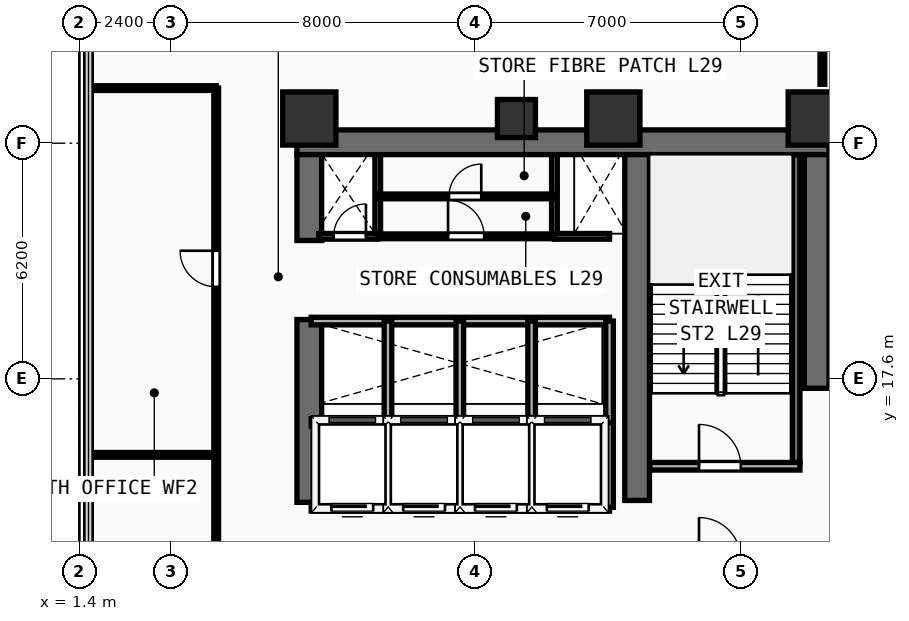
"""IFC4 building model, lengths in metres.
Left out: names, types, materials, properties, quantities, classifications, styles, units other than length and angle.
Written with IfcOpenShell. Run it as: python <this file> out.ifc"""

import sys

from ifc_helpers import new_model, si_unit, direction, frame, frame_2d, origin, origin_2d, place, context, subcontext, project, spatial, rectangle, extrude, element, fill, save


model = new_model("IFC4")
c1 = context("Model", 3, precision=1e-05, world=origin(), true_north=direction((0.0, 1.0)))
c2 = subcontext(c1, "Body", "Model", "MODEL_VIEW")
j1 = project(units=[si_unit("LENGTHUNIT", "METRE"), si_unit("PLANEANGLEUNIT", "RADIAN")], contexts=[c1])
p1 = place(None, origin())
s1 = spatial("IfcSite", under=j1, at=p1, CompositionType="ELEMENT")
p2 = place(p1, origin())
s2 = spatial("IfcBuilding", under=s1, at=p2, CompositionType="ELEMENT")
p3 = place(p2, frame((0.0, 0.0, 114.5)))
s3 = spatial("IfcBuildingStorey", under=s2, at=p3, CompositionType="ELEMENT", Elevation=114.5)
p4 = place(p3, frame((7.125, 23.825, 0.0), z_axis=(0.0, 0.0, 1.0), x_axis=(1.0, 0.0, 0.0)))
e1 = element("IfcWall", 1, at=p4, inside=s3, PredefinedType="SHEAR", context=c2, shape_type="SweptSolid", body=[
    extrude(rectangle(XDim=14.0, YDim=0.65, at=frame_2d((7.0, 0.0))), origin(), (0.0, 0.0, 1.0), 3.54),
])
p5 = place(p3, frame((7.45, 14.35, 0.0), z_axis=(0.0, 0.0, 1.0), x_axis=(0.0, 1.0, 0.0)))
e2 = element("IfcWall", 2, at=p5, inside=s3, PredefinedType="SHEAR", context=c2, shape_type="SweptSolid", body=[
    extrude(rectangle(XDim=4.81, YDim=0.65, at=frame_2d((2.405, 0.0))), origin(), (0.0, 0.0, 1.0), 3.54),
])
p6 = place(p3, frame((7.45, 21.24, 0.0), z_axis=(0.0, 0.0, 1.0), x_axis=(0.0, 1.0, 0.0)))
e3 = element("IfcWall", 3, at=p6, inside=s3, PredefinedType="SHEAR", context=c2, shape_type="SweptSolid", body=[
    extrude(rectangle(XDim=2.26, YDim=0.65, at=frame_2d((1.13, 0.0))), origin(), (0.0, 0.0, 1.0), 3.54),
])
p7 = place(p3, frame((20.8, 17.35, 0.0), z_axis=(0.0, 0.0, 1.0), x_axis=(0.0, 1.0, 0.0)))
e4 = element("IfcWall", 4, at=p7, inside=s3, PredefinedType="SHEAR", context=c2, shape_type="SweptSolid", body=[
    extrude(rectangle(XDim=6.15, YDim=0.65, at=frame_2d((3.075, 0.0))), origin(), (0.0, 0.0, 1.0), 3.54),
])
p8 = place(p3, frame((16.075, 14.4, 0.0), z_axis=(0.0, 0.0, 1.0), x_axis=(0.0, 1.0, 0.0)))
e5 = element("IfcWall", 5, at=p8, inside=s3, PredefinedType="SHEAR", context=c2, shape_type="SweptSolid", body=[
    extrude(rectangle(XDim=9.1, YDim=0.65, at=frame_2d((4.55, 0.0))), origin(), (0.0, 0.0, 1.0), 3.54),
])
for number, where, z_axis, x_axis in (
    (6, (7.45, 24.45, 0.0), (0.0, 0.0, 1.0), (1.0, 0.0, 0.0)),
    (7, (15.45, 24.45, 0.0), (0.0, 0.0, 1.0), (1.0, 0.0, 0.0)),
    (8, (20.75, 24.45, 0.0), (0.0, 0.0, 1.0), (1.0, 0.0, 0.0)),
):
    element("IfcColumn", number, at=place(p3, frame(where, z_axis=z_axis, x_axis=x_axis)), inside=s3, PredefinedType="COLUMN", context=c2, shape_type="SweptSolid", body=[
        extrude(rectangle(XDim=1.4, YDim=1.4, at=origin_2d()), origin(), (0.0, 0.0, 1.0), 3.54),
    ])
p9 = place(p3, frame((12.9, 24.45, 0.0), z_axis=(0.0, 0.0, 1.0), x_axis=(1.0, 0.0, 0.0)))
e9 = element("IfcColumn", 9, at=p9, inside=s3, PredefinedType="COLUMN", context=c2, shape_type="SweptSolid", body=[
    extrude(rectangle(XDim=1.0, YDim=1.0, at=origin_2d()), origin(), (0.0, 0.0, 1.0), 3.54),
])
p10 = place(p3, frame((20.26, 15.4, 0.0), z_axis=(0.0, 0.0, 1.0), x_axis=(0.0, 1.0, 0.0)))
e10 = element("IfcWall", 10, at=p10, inside=s3, PredefinedType="SHEAR", context=c2, shape_type="SweptSolid", body=[
    extrude(rectangle(XDim=8.09, YDim=0.2, at=frame_2d((4.045, 0.0))), origin(), (0.0, 0.0, 1.0), 3.54),
])
p11 = place(p3, frame((16.41, 15.3, 0.0), z_axis=(0.0, 0.0, 1.0), x_axis=(1.0, 0.0, 0.0)))
e11 = element("IfcWall", 11, at=p11, inside=s3, PredefinedType="PARTITIONING", context=c2, shape_type="SweptSolid", body=[
    extrude(rectangle(XDim=3.95, YDim=0.2, at=frame_2d((1.975, 0.0))), origin(), (0.0, 0.0, 1.0), 3.54),
])
p12 = place(p11, frame((1.294, 0.0, 0.0)))
e12 = element("IfcOpeningElement", 12, at=p12, cuts=e11, PredefinedType="OPENING", context=c2, shape_type="SweptSolid", body=[
    extrude(rectangle(XDim=1.1, YDim=2.2, at=frame_2d((0.55, 1.1))), frame((0.0, 0.11, 0.0), z_axis=(0.0, -1.0, 0.0), x_axis=(1.0, 0.0, 0.0)), (0.0, 0.0, 1.0), 0.22),
])
p13 = place(p3, frame((7.5, 14.22, 0.0), z_axis=(0.0, 0.0, 1.0), x_axis=(1.0, 0.0, 0.0)))
e13 = element("IfcWall", 13, at=p13, inside=s3, PredefinedType="PARTITIONING", context=c2, shape_type="SweptSolid", body=[
    extrude(rectangle(XDim=7.85, YDim=0.2, at=frame_2d((3.925, 0.0))), origin(), (0.0, 0.0, 1.0), 3.54),
])
p14 = place(p13, frame((0.53, 0.0, 0.0)))
e14 = element("IfcOpeningElement", 14, at=p14, cuts=e13, PredefinedType="OPENING", context=c2, shape_type="SweptSolid", body=[
    extrude(rectangle(XDim=1.1, YDim=2.2, at=frame_2d((0.55, 1.1))), frame((0.0, 0.11, 0.0), z_axis=(0.0, -1.0, 0.0), x_axis=(1.0, 0.0, 0.0)), (0.0, 0.0, 1.0), 0.22),
])
p15 = place(p13, frame((2.42, 0.0, 0.0)))
e15 = element("IfcOpeningElement", 15, at=p15, cuts=e13, PredefinedType="OPENING", context=c2, shape_type="SweptSolid", body=[
    extrude(rectangle(XDim=1.1, YDim=2.2, at=frame_2d((0.55, 1.1))), frame((0.0, 0.11, 0.0), z_axis=(0.0, -1.0, 0.0), x_axis=(1.0, 0.0, 0.0)), (0.0, 0.0, 1.0), 0.22),
])
p16 = place(p13, frame((4.31, 0.0, 0.0)))
e16 = element("IfcOpeningElement", 16, at=p16, cuts=e13, PredefinedType="OPENING", context=c2, shape_type="SweptSolid", body=[
    extrude(rectangle(XDim=1.1, YDim=2.2, at=frame_2d((0.55, 1.1))), frame((0.0, 0.11, 0.0), z_axis=(0.0, -1.0, 0.0), x_axis=(1.0, 0.0, 0.0)), (0.0, 0.0, 1.0), 0.22),
])
p17 = place(p13, frame((6.2, 0.0, 0.0)))
e17 = element("IfcOpeningElement", 17, at=p17, cuts=e13, PredefinedType="OPENING", context=c2, shape_type="SweptSolid", body=[
    extrude(rectangle(XDim=1.1, YDim=2.2, at=frame_2d((0.55, 1.1))), frame((0.0, 0.11, 0.0), z_axis=(0.0, -1.0, 0.0), x_axis=(1.0, 0.0, 0.0)), (0.0, 0.0, 1.0), 0.22),
])
p18 = place(p3, frame((7.5, 16.45, 0.0), z_axis=(0.0, 0.0, 1.0), x_axis=(1.0, 0.0, 0.0)))
e18 = element("IfcWall", 18, at=p18, inside=s3, PredefinedType="PARTITIONING", context=c2, shape_type="SweptSolid", body=[
    extrude(rectangle(XDim=7.85, YDim=0.2, at=frame_2d((3.925, 0.0))), origin(), (0.0, 0.0, 1.0), 3.54),
])
for number, where, z_axis, x_axis in (
    (19, (15.35, 14.22, 0.0), (0.0, 0.0, 1.0), (0.0, 1.0, 0.0)),
    (20, (9.52, 14.22, 0.0), (0.0, 0.0, 1.0), (0.0, 1.0, 0.0)),
    (21, (11.41, 14.22, 0.0), (0.0, 0.0, 1.0), (0.0, 1.0, 0.0)),
    (22, (13.3, 14.22, 0.0), (0.0, 0.0, 1.0), (0.0, 1.0, 0.0)),
):
    element("IfcWall", number, at=place(p3, frame(where, z_axis=z_axis, x_axis=x_axis)), inside=s3, PredefinedType="PARTITIONING", context=c2, shape_type="SweptSolid", body=[
        extrude(rectangle(XDim=2.23, YDim=0.2, at=frame_2d((1.115, 0.0))), origin(), (0.0, 0.0, 1.0), 3.54),
    ])
p19 = place(p3, frame((7.5, 19.12, 0.0), z_axis=(0.0, 0.0, 1.0), x_axis=(1.0, 0.0, 0.0)))
e23 = element("IfcWall", 23, at=p19, inside=s3, PredefinedType="PARTITIONING", context=c2, shape_type="SweptSolid", body=[
    extrude(rectangle(XDim=7.85, YDim=0.2, at=frame_2d((3.925, 0.0))), origin(), (0.0, 0.0, 1.0), 3.54),
])
for number, where, z_axis, x_axis in (
    (24, (15.35, 16.45, 0.0), (0.0, 0.0, 1.0), (0.0, 1.0, 0.0)),
    (25, (9.52, 16.45, 0.0), (0.0, 0.0, 1.0), (0.0, 1.0, 0.0)),
    (26, (11.41, 16.45, 0.0), (0.0, 0.0, 1.0), (0.0, 1.0, 0.0)),
    (27, (13.3, 16.45, 0.0), (0.0, 0.0, 1.0), (0.0, 1.0, 0.0)),
):
    element("IfcWall", number, at=place(p3, frame(where, z_axis=z_axis, x_axis=x_axis)), inside=s3, PredefinedType="PARTITIONING", context=c2, shape_type="SweptSolid", body=[
        extrude(rectangle(XDim=2.67, YDim=0.2, at=frame_2d((1.335, 0.0))), origin(), (0.0, 0.0, 1.0), 3.54),
    ])
for number, where, z_axis, x_axis in (
    (28, (9.25, 21.35, 0.0), (0.0, 0.0, 1.0), (0.0, 1.0, 0.0)),
    (29, (13.9, 21.35, 0.0), (0.0, 0.0, 1.0), (0.0, 1.0, 0.0)),
):
    element("IfcWall", number, at=place(p3, frame(where, z_axis=z_axis, x_axis=x_axis)), inside=s3, PredefinedType="PARTITIONING", context=c2, shape_type="SweptSolid", body=[
        extrude(rectangle(XDim=2.13, YDim=0.15, at=frame_2d((1.065, 0.0))), origin(), (0.0, 0.0, 1.0), 3.54),
    ])
p20 = place(p3, frame((7.7, 21.35, 0.0), z_axis=(0.0, 0.0, 1.0), x_axis=(1.0, 0.0, 0.0)))
e30 = element("IfcWall", 30, at=p20, inside=s3, PredefinedType="PARTITIONING", context=c2, shape_type="SweptSolid", body=[
    extrude(rectangle(XDim=1.55, YDim=0.15, at=frame_2d((0.775, 0.0))), origin(), (0.0, 0.0, 1.0), 3.54),
])
p21 = place(p20, frame((0.39, 0.0, 0.0)))
e31 = element("IfcOpeningElement", 31, at=p21, cuts=e30, PredefinedType="OPENING", context=c2, shape_type="SweptSolid", body=[
    extrude(rectangle(XDim=0.85, YDim=2.15, at=frame_2d((0.425, 1.075))), frame((0.0, 0.085, 0.0), z_axis=(0.0, -1.0, 0.0), x_axis=(1.0, 0.0, 0.0)), (0.0, 0.0, 1.0), 0.17),
])
p22 = place(p3, frame((13.9, 21.35, 0.0), z_axis=(0.0, 0.0, 1.0), x_axis=(1.0, 0.0, 0.0)))
e32 = element("IfcWall", 32, at=p22, inside=s3, PredefinedType="PARTITIONING", context=c2, shape_type="SweptSolid", body=[
    extrude(rectangle(XDim=1.45, YDim=0.15, at=frame_2d((0.725, 0.0))), origin(), (0.0, 0.0, 1.0), 3.54),
])
p23 = place(p3, frame((9.25, 21.35, 0.0), z_axis=(0.0, 0.0, 1.0), x_axis=(1.0, 0.0, 0.0)))
e33 = element("IfcWall", 33, at=p23, inside=s3, PredefinedType="PARTITIONING", context=c2, shape_type="SweptSolid", body=[
    extrude(rectangle(XDim=4.65, YDim=0.125, at=frame_2d((2.325, 0.0))), origin(), (0.0, 0.0, 1.0), 3.54),
])
p24 = place(p23, frame((1.85, 0.0, 0.0)))
e34 = element("IfcOpeningElement", 34, at=p24, cuts=e33, PredefinedType="OPENING", context=c2, shape_type="SweptSolid", body=[
    extrude(rectangle(XDim=0.95, YDim=2.15, at=frame_2d((0.475, 1.075))), frame((0.0, 0.073, 0.0), z_axis=(0.0, -1.0, 0.0), x_axis=(1.0, 0.0, 0.0)), (0.0, 0.0, 1.0), 0.145),
])
p25 = place(p3, frame((9.25, 22.4, 0.0), z_axis=(0.0, 0.0, 1.0), x_axis=(1.0, 0.0, 0.0)))
e35 = element("IfcWall", 35, at=p25, inside=s3, PredefinedType="PARTITIONING", context=c2, shape_type="SweptSolid", body=[
    extrude(rectangle(XDim=4.65, YDim=0.125, at=frame_2d((2.325, 0.0))), origin(), (0.0, 0.0, 1.0), 3.54),
])
p26 = place(p25, frame((1.875, 0.0, 0.0)))
e36 = element("IfcOpeningElement", 36, at=p26, cuts=e35, PredefinedType="OPENING", context=c2, shape_type="SweptSolid", body=[
    extrude(rectangle(XDim=0.85, YDim=2.15, at=frame_2d((0.425, 1.075))), frame((0.0, 0.073, 0.0), z_axis=(0.0, -1.0, 0.0), x_axis=(1.0, 0.0, 0.0)), (0.0, 0.0, 1.0), 0.145),
])
p27 = place(p3, frame((5.0, 7.5, 0.0), z_axis=(0.0, 0.0, 1.0), x_axis=(0.0, 1.0, 0.0)))
e37 = element("IfcWall", 37, at=p27, inside=s3, PredefinedType="PARTITIONING", context=c2, shape_type="SweptSolid", body=[
    extrude(rectangle(XDim=17.75, YDim=0.125, at=frame_2d((8.875, 0.0))), origin(), (0.0, 0.0, 1.0), 3.54),
])
p28 = place(p27, frame((3.55, 0.0, 0.0)))
e38 = element("IfcOpeningElement", 38, at=p28, cuts=e37, PredefinedType="OPENING", context=c2, shape_type="SweptSolid", body=[
    extrude(rectangle(XDim=0.95, YDim=2.15, at=frame_2d((0.475, 1.075))), frame((0.0, 0.073, 0.0), z_axis=(0.0, -1.0, 0.0), x_axis=(1.0, 0.0, 0.0)), (0.0, 0.0, 1.0), 0.145),
])
p29 = place(p27, frame((12.521, 0.0, 0.0)))
e39 = element("IfcOpeningElement", 39, at=p29, cuts=e37, PredefinedType="OPENING", context=c2, shape_type="SweptSolid", body=[
    extrude(rectangle(XDim=0.95, YDim=2.15, at=frame_2d((0.475, 1.075))), frame((0.0, 0.073, 0.0), z_axis=(0.0, -1.0, 0.0), x_axis=(1.0, 0.0, 0.0)), (0.0, 0.0, 1.0), 0.145),
])
for number, where, z_axis, x_axis in (
    (40, (1.64, 25.25, 0.0), (0.0, 0.0, 1.0), (1.0, 0.0, 0.0)),
    (41, (1.64, 15.6, 0.0), (0.0, 0.0, 1.0), (1.0, 0.0, 0.0)),
):
    element("IfcWall", number, at=place(p3, frame(where, z_axis=z_axis, x_axis=x_axis)), inside=s3, PredefinedType="PARTITIONING", context=c2, shape_type="SweptSolid", body=[
        extrude(rectangle(XDim=3.36, YDim=0.125, at=frame_2d((1.68, 0.0))), origin(), (0.0, 0.0, 1.0), 3.54),
    ])
p30 = place(p3, frame((20.95, 25.35, 0.0), z_axis=(0.0, 0.0, 1.0), x_axis=(0.0, 1.0, 0.0)))
e42 = element("IfcWall", 42, at=p30, inside=s3, PredefinedType="PARTITIONING", context=c2, shape_type="SweptSolid", body=[
    extrude(rectangle(XDim=10.35, YDim=0.125, at=frame_2d((5.175, 0.0))), origin(), (0.0, 0.0, 1.0), 3.54),
])
p31 = place(p30, frame((7.002, 0.0, 0.0)))
e43 = element("IfcOpeningElement", 43, at=p31, cuts=e42, PredefinedType="OPENING", context=c2, shape_type="SweptSolid", body=[
    extrude(rectangle(XDim=0.85, YDim=2.15, at=frame_2d((0.425, 1.075))), frame((0.0, 0.073, 0.0), z_axis=(0.0, -1.0, 0.0), x_axis=(1.0, 0.0, 0.0)), (0.0, 0.0, 1.0), 0.145),
])
p32 = place(p12, origin())
e44 = element("IfcDoor", 44, at=p32, inside=s3, OperationType="SINGLE_SWING_LEFT", PredefinedType="DOOR", context=c2, shape_type="SweptSolid", body=[
    extrude(rectangle(XDim=1.1, YDim=2.2, at=frame_2d((0.55, 1.1))), frame((0.0, 0.025, 0.0), z_axis=(0.0, -1.0, 0.0), x_axis=(1.0, 0.0, 0.0)), (0.0, 0.0, 1.0), 0.05),
])
fill(e12, e44)
p33 = place(p14, frame((1.1, 0.0, 0.0), z_axis=(0.0, 0.0, 1.0), x_axis=(-1.0, 0.0, 0.0)))
e45 = element("IfcDoor", 45, at=p33, inside=s3, OperationType="SLIDING_TO_LEFT", PredefinedType="DOOR", context=c2, shape_type="SweptSolid", body=[
    extrude(rectangle(XDim=1.1, YDim=2.2, at=frame_2d((0.55, 1.1))), frame((0.0, 0.025, 0.0), z_axis=(0.0, -1.0, 0.0), x_axis=(1.0, 0.0, 0.0)), (0.0, 0.0, 1.0), 0.05),
])
fill(e14, e45)
p34 = place(p15, frame((1.1, 0.0, 0.0), z_axis=(0.0, 0.0, 1.0), x_axis=(-1.0, 0.0, 0.0)))
e46 = element("IfcDoor", 46, at=p34, inside=s3, OperationType="SLIDING_TO_LEFT", PredefinedType="DOOR", context=c2, shape_type="SweptSolid", body=[
    extrude(rectangle(XDim=1.1, YDim=2.2, at=frame_2d((0.55, 1.1))), frame((0.0, 0.025, 0.0), z_axis=(0.0, -1.0, 0.0), x_axis=(1.0, 0.0, 0.0)), (0.0, 0.0, 1.0), 0.05),
])
fill(e15, e46)
p35 = place(p16, frame((1.1, 0.0, 0.0), z_axis=(0.0, 0.0, 1.0), x_axis=(-1.0, 0.0, 0.0)))
e47 = element("IfcDoor", 47, at=p35, inside=s3, OperationType="SLIDING_TO_LEFT", PredefinedType="DOOR", context=c2, shape_type="SweptSolid", body=[
    extrude(rectangle(XDim=1.1, YDim=2.2, at=frame_2d((0.55, 1.1))), frame((0.0, 0.025, 0.0), z_axis=(0.0, -1.0, 0.0), x_axis=(1.0, 0.0, 0.0)), (0.0, 0.0, 1.0), 0.05),
])
fill(e16, e47)
p36 = place(p17, frame((1.1, 0.0, 0.0), z_axis=(0.0, 0.0, 1.0), x_axis=(-1.0, 0.0, 0.0)))
e48 = element("IfcDoor", 48, at=p36, inside=s3, OperationType="SLIDING_TO_LEFT", PredefinedType="DOOR", context=c2, shape_type="SweptSolid", body=[
    extrude(rectangle(XDim=1.1, YDim=2.2, at=frame_2d((0.55, 1.1))), frame((0.0, 0.025, 0.0), z_axis=(0.0, -1.0, 0.0), x_axis=(1.0, 0.0, 0.0)), (0.0, 0.0, 1.0), 0.05),
])
fill(e17, e48)
p37 = place(p21, origin())
e49 = element("IfcDoor", 49, at=p37, inside=s3, OperationType="SINGLE_SWING_RIGHT", PredefinedType="DOOR", context=c2, shape_type="SweptSolid", body=[
    extrude(rectangle(XDim=0.85, YDim=2.15, at=frame_2d((0.425, 1.075))), frame((0.0, 0.025, 0.0), z_axis=(0.0, -1.0, 0.0), x_axis=(1.0, 0.0, 0.0)), (0.0, 0.0, 1.0), 0.05),
])
fill(e31, e49)
p38 = place(p24, origin())
e50 = element("IfcDoor", 50, at=p38, inside=s3, OperationType="SINGLE_SWING_LEFT", PredefinedType="DOOR", context=c2, shape_type="SweptSolid", body=[
    extrude(rectangle(XDim=0.95, YDim=2.15, at=frame_2d((0.475, 1.075))), frame((0.0, 0.025, 0.0), z_axis=(0.0, -1.0, 0.0), x_axis=(1.0, 0.0, 0.0)), (0.0, 0.0, 1.0), 0.05),
])
fill(e34, e50)
p39 = place(p26, origin())
e51 = element("IfcDoor", 51, at=p39, inside=s3, OperationType="SINGLE_SWING_RIGHT", PredefinedType="DOOR", context=c2, shape_type="SweptSolid", body=[
    extrude(rectangle(XDim=0.85, YDim=2.15, at=frame_2d((0.425, 1.075))), frame((0.0, 0.025, 0.0), z_axis=(0.0, -1.0, 0.0), x_axis=(1.0, 0.0, 0.0)), (0.0, 0.0, 1.0), 0.05),
])
fill(e36, e51)
p40 = place(p29, origin())
e52 = element("IfcDoor", 52, at=p40, inside=s3, OperationType="SINGLE_SWING_RIGHT", PredefinedType="DOOR", context=c2, shape_type="SweptSolid", body=[
    extrude(rectangle(XDim=0.95, YDim=2.15, at=frame_2d((0.475, 1.075))), frame((0.0, 0.025, 0.0), z_axis=(0.0, -1.0, 0.0), x_axis=(1.0, 0.0, 0.0)), (0.0, 0.0, 1.0), 0.05),
])
fill(e39, e52)
save(model, sys.argv[1])
